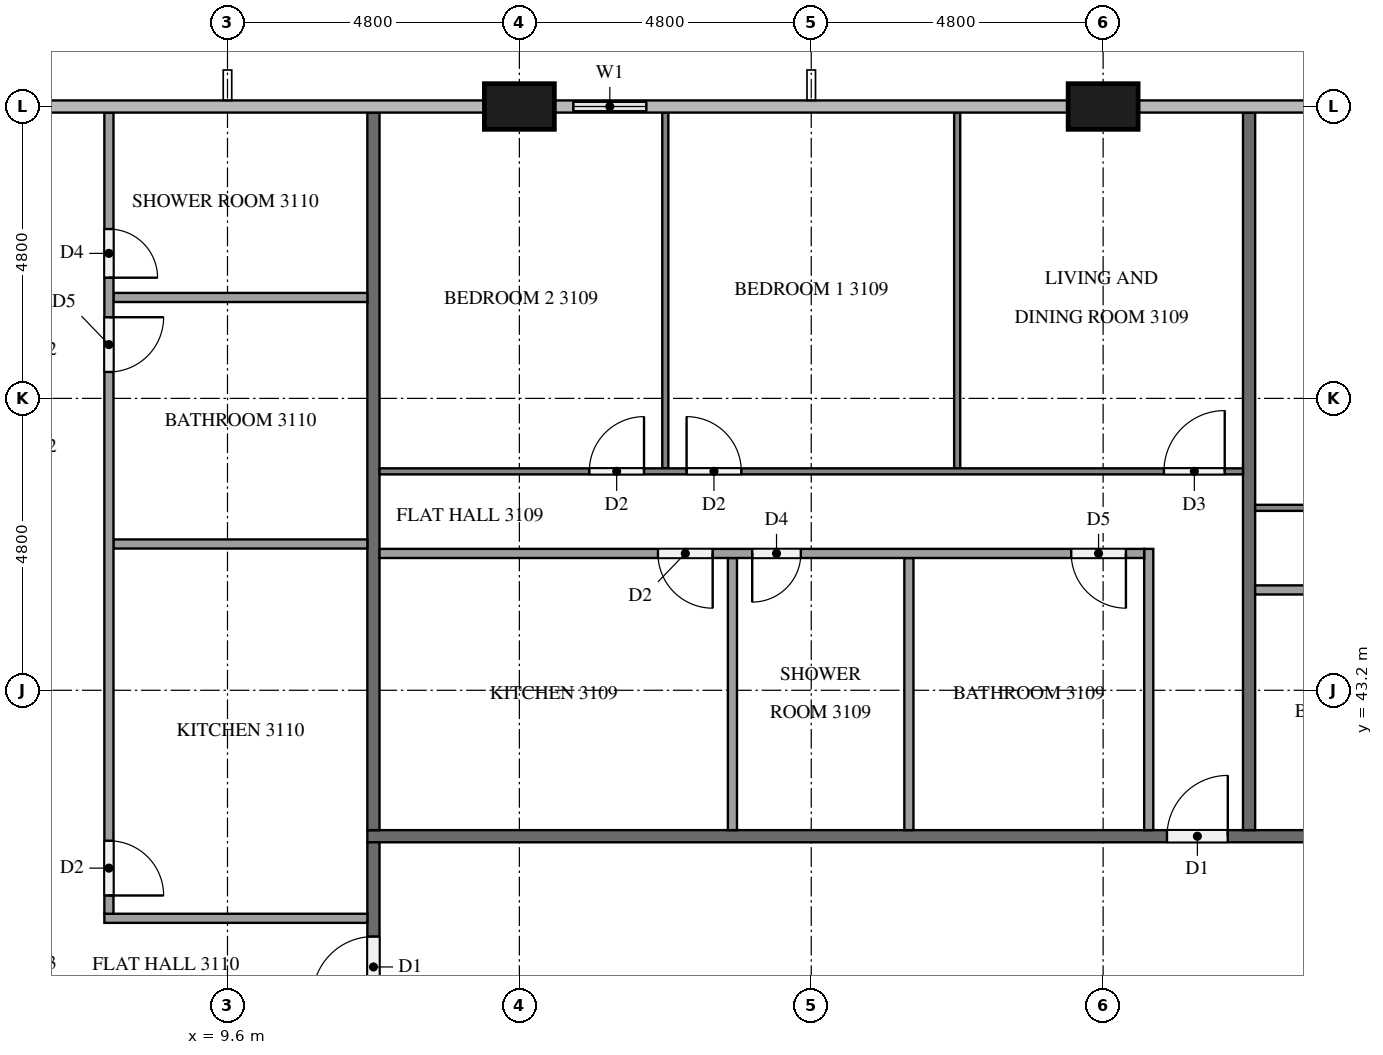
"""IFC4 building model, lengths in metres.
Left out: names, types, materials, properties, quantities, classifications, styles, units other than length and angle.
Written with IfcOpenShell. Run it as: python <this file> out.ifc"""

import sys

from ifc_helpers import new_model, si_unit, direction, frame, frame_2d, origin, origin_2d, place, context, subcontext, project, spatial, rectangle, extrude, element, fill, save


model = new_model("IFC4")
c1 = context("Model", 3, precision=1e-05, world=origin(), true_north=direction((0.0, 1.0)))
c2 = subcontext(c1, "Body", "Model", "MODEL_VIEW")
j1 = project(units=[si_unit("LENGTHUNIT", "METRE"), si_unit("PLANEANGLEUNIT", "RADIAN")], contexts=[c1])
p1 = place(None, origin())
s1 = spatial("IfcSite", under=j1, at=p1, CompositionType="ELEMENT")
p2 = place(p1, origin())
s2 = spatial("IfcBuilding", under=s1, at=p2, CompositionType="ELEMENT")
p3 = place(p2, frame((0.0, 0.0, 122.6)))
s3 = spatial("IfcBuildingStorey", under=s2, at=p3, CompositionType="ELEMENT", Elevation=122.6)
for number, where, z_axis, x_axis in (
    (1, (24.0, 52.8, 0.0), (0.0, 0.0, 1.0), (1.0, 0.0, 0.0)),
    (2, (14.4, 52.8, 0.0), (0.0, 0.0, 1.0), (1.0, 0.0, 0.0)),
):
    element("IfcColumn", number, at=place(p3, frame(where, z_axis=z_axis, x_axis=x_axis)), inside=s3, PredefinedType="COLUMN", context=c2, shape_type="SweptSolid", body=[
        extrude(rectangle(XDim=1.15, YDim=0.75, at=origin_2d()), origin(), (0.0, 0.0, 1.0), 3.2),
    ])
p4 = place(p3, frame((16.8, 52.8, 0.0), z_axis=(0.0, 0.0, 1.0), x_axis=(-1.0, 0.0, 0.0)))
e3 = element("IfcWall", 3, at=p4, inside=s3, PredefinedType="SOLIDWALL", context=c2, shape_type="SweptSolid", body=[
    extrude(rectangle(XDim=1.825, YDim=0.15, at=frame_2d((0.913, 0.0))), origin(), (0.0, 0.0, 1.0), 3.2),
])
p5 = place(p4, frame((0.312, 0.0, 0.9)))
e4 = element("IfcOpeningElement", 4, at=p5, cuts=e3, PredefinedType="OPENING", context=c2, shape_type="SweptSolid", body=[
    extrude(rectangle(XDim=1.2, YDim=1.4, at=frame_2d((0.6, 0.7))), frame((0.0, 0.085, 0.0), z_axis=(0.0, -1.0, 0.0), x_axis=(1.0, 0.0, 0.0)), (0.0, 0.0, 1.0), 0.17),
])
p6 = place(p3, frame((11.9, 40.8, 0.0), z_axis=(0.0, 0.0, 1.0), x_axis=(1.0, 0.0, 0.0)))
e5 = element("IfcWall", 5, at=p6, inside=s3, PredefinedType="PARTITIONING", context=c2, shape_type="SweptSolid", body=[
    extrude(rectangle(XDim=38.6, YDim=0.2, at=frame_2d((19.3, 0.0))), origin(), (0.0, 0.0, 1.0), 3.2),
])
p7 = place(p6, frame((37.15, 0.0, 0.0)))
e6 = element("IfcOpeningElement", 6, at=p7, cuts=e5, PredefinedType="OPENING", context=c2, shape_type="SweptSolid", body=[
    extrude(rectangle(XDim=1.0, YDim=2.1, at=frame_2d((0.5, 1.05))), frame((0.0, 0.11, 0.0), z_axis=(0.0, -1.0, 0.0), x_axis=(1.0, 0.0, 0.0)), (0.0, 0.0, 1.0), 0.22),
])
p8 = place(p6, frame((27.55, 0.0, 0.0)))
e7 = element("IfcOpeningElement", 7, at=p8, cuts=e5, PredefinedType="OPENING", context=c2, shape_type="SweptSolid", body=[
    extrude(rectangle(XDim=1.0, YDim=2.1, at=frame_2d((0.5, 1.05))), frame((0.0, 0.11, 0.0), z_axis=(0.0, -1.0, 0.0), x_axis=(1.0, 0.0, 0.0)), (0.0, 0.0, 1.0), 0.22),
])
p9 = place(p6, frame((13.15, 0.0, 0.0)))
e8 = element("IfcOpeningElement", 8, at=p9, cuts=e5, PredefinedType="OPENING", context=c2, shape_type="SweptSolid", body=[
    extrude(rectangle(XDim=1.0, YDim=2.1, at=frame_2d((0.5, 1.05))), frame((0.0, 0.11, 0.0), z_axis=(0.0, -1.0, 0.0), x_axis=(1.0, 0.0, 0.0)), (0.0, 0.0, 1.0), 0.22),
])
p10 = place(p3, frame((12.0, 37.9, 0.0), z_axis=(0.0, 0.0, 1.0), x_axis=(0.0, 1.0, 0.0)))
e9 = element("IfcWall", 9, at=p10, inside=s3, PredefinedType="PARTITIONING", context=c2, shape_type="SweptSolid", body=[
    extrude(rectangle(XDim=2.8, YDim=0.2, at=frame_2d((1.4, 0.0))), origin(), (0.0, 0.0, 1.0), 3.2),
])
p11 = place(p10, frame((0.25, 0.0, 0.0)))
e10 = element("IfcOpeningElement", 10, at=p11, cuts=e9, PredefinedType="OPENING", context=c2, shape_type="SweptSolid", body=[
    extrude(rectangle(XDim=1.0, YDim=2.1, at=frame_2d((0.5, 1.05))), frame((0.0, 0.11, 0.0), z_axis=(0.0, -1.0, 0.0), x_axis=(1.0, 0.0, 0.0)), (0.0, 0.0, 1.0), 0.22),
])
for number, where, z_axis, x_axis in (
    (11, (26.4, 52.7, 0.0), (0.0, 0.0, 1.0), (0.0, -1.0, 0.0)),
    (12, (12.0, 52.7, 0.0), (0.0, 0.0, 1.0), (0.0, -1.0, 0.0)),
):
    element("IfcWall", number, at=place(p3, frame(where, z_axis=z_axis, x_axis=x_axis)), inside=s3, PredefinedType="PARTITIONING", context=c2, shape_type="SweptSolid", body=[
        extrude(rectangle(XDim=11.8, YDim=0.2, at=frame_2d((5.9, 0.0))), origin(), (0.0, 0.0, 1.0), 3.2),
    ])
p12 = place(p3, frame((26.5, 46.2, 0.0), z_axis=(0.0, 0.0, 1.0), x_axis=(1.0, 0.0, 0.0)))
e13 = element("IfcWall", 13, at=p12, inside=s3, PredefinedType="PARTITIONING", context=c2, shape_type="SweptSolid", body=[
    extrude(rectangle(XDim=14.2, YDim=0.1, at=frame_2d((7.1, 0.0))), origin(), (0.0, 0.0, 1.0), 3.2),
])
p13 = place(p12, frame((12.9, 0.0, 0.0)))
e14 = element("IfcOpeningElement", 14, at=p13, cuts=e13, PredefinedType="OPENING", context=c2, shape_type="SweptSolid", body=[
    extrude(rectangle(XDim=1.0, YDim=2.1, at=frame_2d((0.5, 1.05))), frame((0.0, 0.06, 0.0), z_axis=(0.0, -1.0, 0.0), x_axis=(1.0, 0.0, 0.0)), (0.0, 0.0, 1.0), 0.12),
])
p14 = place(p12, frame((5.05, 0.0, 0.0)))
e15 = element("IfcOpeningElement", 15, at=p14, cuts=e13, PredefinedType="OPENING", context=c2, shape_type="SweptSolid", body=[
    extrude(rectangle(XDim=0.9, YDim=2.1, at=frame_2d((0.45, 1.05))), frame((0.0, 0.06, 0.0), z_axis=(0.0, -1.0, 0.0), x_axis=(1.0, 0.0, 0.0)), (0.0, 0.0, 1.0), 0.12),
])
p15 = place(p12, frame((3.45, 0.0, 0.0)))
e16 = element("IfcOpeningElement", 16, at=p15, cuts=e13, PredefinedType="OPENING", context=c2, shape_type="SweptSolid", body=[
    extrude(rectangle(XDim=0.9, YDim=2.1, at=frame_2d((0.45, 1.05))), frame((0.0, 0.06, 0.0), z_axis=(0.0, -1.0, 0.0), x_axis=(1.0, 0.0, 0.0)), (0.0, 0.0, 1.0), 0.12),
])
p16 = place(p3, frame((39.075, 44.85, 0.0), z_axis=(0.0, 0.0, 1.0), x_axis=(-1.0, 0.0, 0.0)))
e17 = element("IfcWall", 17, at=p16, inside=s3, PredefinedType="PARTITIONING", context=c2, shape_type="SweptSolid", body=[
    extrude(rectangle(XDim=12.575, YDim=0.15, at=frame_2d((6.288, 0.0))), origin(), (0.0, 0.0, 1.0), 3.2),
])
p17 = place(p16, frame((0.3, 0.0, 0.0)))
e18 = element("IfcOpeningElement", 18, at=p17, cuts=e17, PredefinedType="OPENING", context=c2, shape_type="SweptSolid", body=[
    extrude(rectangle(XDim=0.8, YDim=2.1, at=frame_2d((0.4, 1.05))), frame((0.0, 0.085, 0.0), z_axis=(0.0, -1.0, 0.0), x_axis=(1.0, 0.0, 0.0)), (0.0, 0.0, 1.0), 0.17),
])
p18 = place(p16, frame((7.481, 0.0, 0.0)))
e19 = element("IfcOpeningElement", 19, at=p18, cuts=e17, PredefinedType="OPENING", context=c2, shape_type="SweptSolid", body=[
    extrude(rectangle(XDim=0.9, YDim=2.1, at=frame_2d((0.45, 1.05))), frame((0.0, 0.085, 0.0), z_axis=(0.0, -1.0, 0.0), x_axis=(1.0, 0.0, 0.0)), (0.0, 0.0, 1.0), 0.17),
])
p19 = place(p16, frame((9.031, 0.0, 0.0)))
e20 = element("IfcOpeningElement", 20, at=p19, cuts=e17, PredefinedType="OPENING", context=c2, shape_type="SweptSolid", body=[
    extrude(rectangle(XDim=0.9, YDim=2.1, at=frame_2d((0.45, 1.05))), frame((0.0, 0.085, 0.0), z_axis=(0.0, -1.0, 0.0), x_axis=(1.0, 0.0, 0.0)), (0.0, 0.0, 1.0), 0.17),
])
for number, where, z_axis, x_axis in (
    (21, (21.6, 46.85, 0.0), (0.0, 0.0, 1.0), (0.0, 1.0, 0.0)),
    (22, (16.8, 46.85, 0.0), (0.0, 0.0, 1.0), (0.0, 1.0, 0.0)),
):
    element("IfcWall", number, at=place(p3, frame(where, z_axis=z_axis, x_axis=x_axis)), inside=s3, PredefinedType="PARTITIONING", context=c2, shape_type="SweptSolid", body=[
        extrude(rectangle(XDim=5.85, YDim=0.1, at=frame_2d((2.925, 0.0))), origin(), (0.0, 0.0, 1.0), 3.2),
    ])
p20 = place(p3, frame((12.1, 46.8, 0.0), z_axis=(0.0, 0.0, 1.0), x_axis=(1.0, 0.0, 0.0)))
e23 = element("IfcWall", 23, at=p20, inside=s3, PredefinedType="PARTITIONING", context=c2, shape_type="SweptSolid", body=[
    extrude(rectangle(XDim=14.2, YDim=0.1, at=frame_2d((7.1, 0.0))), origin(), (0.0, 0.0, 1.0), 3.2),
])
p21 = place(p20, frame((12.9, 0.0, 0.0)))
e24 = element("IfcOpeningElement", 24, at=p21, cuts=e23, PredefinedType="OPENING", context=c2, shape_type="SweptSolid", body=[
    extrude(rectangle(XDim=1.0, YDim=2.1, at=frame_2d((0.5, 1.05))), frame((0.0, 0.06, 0.0), z_axis=(0.0, -1.0, 0.0), x_axis=(1.0, 0.0, 0.0)), (0.0, 0.0, 1.0), 0.12),
])
p22 = place(p20, frame((5.05, 0.0, 0.0)))
e25 = element("IfcOpeningElement", 25, at=p22, cuts=e23, PredefinedType="OPENING", context=c2, shape_type="SweptSolid", body=[
    extrude(rectangle(XDim=0.9, YDim=2.1, at=frame_2d((0.45, 1.05))), frame((0.0, 0.06, 0.0), z_axis=(0.0, -1.0, 0.0), x_axis=(1.0, 0.0, 0.0)), (0.0, 0.0, 1.0), 0.12),
])
p23 = place(p20, frame((3.45, 0.0, 0.0)))
e26 = element("IfcOpeningElement", 26, at=p23, cuts=e23, PredefinedType="OPENING", context=c2, shape_type="SweptSolid", body=[
    extrude(rectangle(XDim=0.9, YDim=2.1, at=frame_2d((0.45, 1.05))), frame((0.0, 0.06, 0.0), z_axis=(0.0, -1.0, 0.0), x_axis=(1.0, 0.0, 0.0)), (0.0, 0.0, 1.0), 0.12),
])
for number, where, z_axis, x_axis in (
    (27, (20.806, 40.9, 0.0), (0.0, 0.0, 1.0), (0.0, 1.0, 0.0)),
    (28, (17.904, 40.9, 0.0), (0.0, 0.0, 1.0), (0.0, 1.0, 0.0)),
):
    element("IfcWall", number, at=place(p3, frame(where, z_axis=z_axis, x_axis=x_axis)), inside=s3, PredefinedType="PARTITIONING", context=c2, shape_type="SweptSolid", body=[
        extrude(rectangle(XDim=4.475, YDim=0.15, at=frame_2d((2.238, 0.0))), origin(), (0.0, 0.0, 1.0), 3.2),
    ])
p24 = place(p3, frame((24.75, 40.9, 0.0), z_axis=(0.0, 0.0, 1.0), x_axis=(0.0, 1.0, 0.0)))
e29 = element("IfcWall", 29, at=p24, inside=s3, PredefinedType="PARTITIONING", context=c2, shape_type="SweptSolid", body=[
    extrude(rectangle(XDim=4.625, YDim=0.15, at=frame_2d((2.312, 0.0))), origin(), (0.0, 0.0, 1.0), 3.2),
])
p25 = place(p3, frame((24.675, 45.45, 0.0), z_axis=(0.0, 0.0, 1.0), x_axis=(-1.0, 0.0, 0.0)))
e30 = element("IfcWall", 30, at=p25, inside=s3, PredefinedType="PARTITIONING", context=c2, shape_type="SweptSolid", body=[
    extrude(rectangle(XDim=12.575, YDim=0.15, at=frame_2d((6.288, 0.0))), origin(), (0.0, 0.0, 1.0), 3.2),
])
p26 = place(p25, frame((0.3, 0.0, 0.0)))
e31 = element("IfcOpeningElement", 31, at=p26, cuts=e30, PredefinedType="OPENING", context=c2, shape_type="SweptSolid", body=[
    extrude(rectangle(XDim=0.9, YDim=2.1, at=frame_2d((0.45, 1.05))), frame((0.0, 0.085, 0.0), z_axis=(0.0, -1.0, 0.0), x_axis=(1.0, 0.0, 0.0)), (0.0, 0.0, 1.0), 0.17),
])
p27 = place(p25, frame((5.646, 0.0, 0.0)))
e32 = element("IfcOpeningElement", 32, at=p27, cuts=e30, PredefinedType="OPENING", context=c2, shape_type="SweptSolid", body=[
    extrude(rectangle(XDim=0.8, YDim=2.1, at=frame_2d((0.4, 1.05))), frame((0.0, 0.085, 0.0), z_axis=(0.0, -1.0, 0.0), x_axis=(1.0, 0.0, 0.0)), (0.0, 0.0, 1.0), 0.17),
])
p28 = place(p25, frame((7.096, 0.0, 0.0)))
e33 = element("IfcOpeningElement", 33, at=p28, cuts=e30, PredefinedType="OPENING", context=c2, shape_type="SweptSolid", body=[
    extrude(rectangle(XDim=0.9, YDim=2.1, at=frame_2d((0.45, 1.05))), frame((0.0, 0.085, 0.0), z_axis=(0.0, -1.0, 0.0), x_axis=(1.0, 0.0, 0.0)), (0.0, 0.0, 1.0), 0.17),
])
for number, where, z_axis, x_axis in (
    (34, (11.9, 45.606, 0.0), (0.0, 0.0, 1.0), (-1.0, 0.0, 0.0)),
    (35, (11.9, 49.66, 0.0), (0.0, 0.0, 1.0), (-1.0, 0.0, 0.0)),
):
    element("IfcWall", number, at=place(p3, frame(where, z_axis=z_axis, x_axis=x_axis)), inside=s3, PredefinedType="PARTITIONING", context=c2, shape_type="SweptSolid", body=[
        extrude(rectangle(XDim=4.175, YDim=0.15, at=frame_2d((2.087, 0.0))), origin(), (0.0, 0.0, 1.0), 3.2),
    ])
p29 = place(p3, frame((11.9, 39.45, 0.0), z_axis=(0.0, 0.0, 1.0), x_axis=(-1.0, 0.0, 0.0)))
e36 = element("IfcWall", 36, at=p29, inside=s3, PredefinedType="PARTITIONING", context=c2, shape_type="SweptSolid", body=[
    extrude(rectangle(XDim=4.325, YDim=0.15, at=frame_2d((2.163, 0.0))), origin(), (0.0, 0.0, 1.0), 3.2),
])
p30 = place(p3, frame((7.65, 52.7, 0.0), z_axis=(0.0, 0.0, 1.0), x_axis=(0.0, -1.0, 0.0)))
e37 = element("IfcWall", 37, at=p30, inside=s3, PredefinedType="PARTITIONING", context=c2, shape_type="SweptSolid", body=[
    extrude(rectangle(XDim=13.175, YDim=0.15, at=frame_2d((6.587, 0.0))), origin(), (0.0, 0.0, 1.0), 3.2),
])
p31 = place(p30, frame((11.975, 0.0, 0.0)))
e38 = element("IfcOpeningElement", 38, at=p31, cuts=e37, PredefinedType="OPENING", context=c2, shape_type="SweptSolid", body=[
    extrude(rectangle(XDim=0.9, YDim=2.1, at=frame_2d((0.45, 1.05))), frame((0.0, 0.085, 0.0), z_axis=(0.0, -1.0, 0.0), x_axis=(1.0, 0.0, 0.0)), (0.0, 0.0, 1.0), 0.17),
])
p32 = place(p30, frame((3.365, 0.0, 0.0)))
e39 = element("IfcOpeningElement", 39, at=p32, cuts=e37, PredefinedType="OPENING", context=c2, shape_type="SweptSolid", body=[
    extrude(rectangle(XDim=0.9, YDim=2.1, at=frame_2d((0.45, 1.05))), frame((0.0, 0.085, 0.0), z_axis=(0.0, -1.0, 0.0), x_axis=(1.0, 0.0, 0.0)), (0.0, 0.0, 1.0), 0.17),
])
p33 = place(p30, frame((1.915, 0.0, 0.0)))
e40 = element("IfcOpeningElement", 40, at=p33, cuts=e37, PredefinedType="OPENING", context=c2, shape_type="SweptSolid", body=[
    extrude(rectangle(XDim=0.8, YDim=2.1, at=frame_2d((0.4, 1.05))), frame((0.0, 0.085, 0.0), z_axis=(0.0, -1.0, 0.0), x_axis=(1.0, 0.0, 0.0)), (0.0, 0.0, 1.0), 0.17),
])
p34 = place(p5, origin())
e41 = element("IfcWindow", 41, at=p34, inside=s3, PartitioningType="SINGLE_PANEL", PredefinedType="WINDOW", context=c2, shape_type="SweptSolid", body=[
    extrude(rectangle(XDim=1.2, YDim=1.4, at=frame_2d((0.6, 0.7))), frame((0.0, 0.03, 0.0), z_axis=(0.0, -1.0, 0.0), x_axis=(1.0, 0.0, 0.0)), (0.0, 0.0, 1.0), 0.06),
])
fill(e4, e41)
p35 = place(p9, origin())
e42 = element("IfcDoor", 42, at=p35, inside=s3, OperationType="SINGLE_SWING_RIGHT", PredefinedType="DOOR", context=c2, shape_type="SweptSolid", body=[
    extrude(rectangle(XDim=1.0, YDim=2.1, at=frame_2d((0.5, 1.05))), frame((0.0, 0.025, 0.0), z_axis=(0.0, -1.0, 0.0), x_axis=(1.0, 0.0, 0.0)), (0.0, 0.0, 1.0), 0.05),
])
fill(e8, e42)
p36 = place(p11, origin())
e43 = element("IfcDoor", 43, at=p36, inside=s3, OperationType="SINGLE_SWING_LEFT", PredefinedType="DOOR", context=c2, shape_type="SweptSolid", body=[
    extrude(rectangle(XDim=1.0, YDim=2.1, at=frame_2d((0.5, 1.05))), frame((0.0, 0.025, 0.0), z_axis=(0.0, -1.0, 0.0), x_axis=(1.0, 0.0, 0.0)), (0.0, 0.0, 1.0), 0.05),
])
fill(e10, e43)
p37 = place(p21, origin())
e44 = element("IfcDoor", 44, at=p37, inside=s3, OperationType="SINGLE_SWING_RIGHT", PredefinedType="DOOR", context=c2, shape_type="SweptSolid", body=[
    extrude(rectangle(XDim=1.0, YDim=2.1, at=frame_2d((0.5, 1.05))), frame((0.0, 0.025, 0.0), z_axis=(0.0, -1.0, 0.0), x_axis=(1.0, 0.0, 0.0)), (0.0, 0.0, 1.0), 0.05),
])
fill(e24, e44)
p38 = place(p22, origin())
e45 = element("IfcDoor", 45, at=p38, inside=s3, OperationType="SINGLE_SWING_LEFT", PredefinedType="DOOR", context=c2, shape_type="SweptSolid", body=[
    extrude(rectangle(XDim=0.9, YDim=2.1, at=frame_2d((0.45, 1.05))), frame((0.0, 0.025, 0.0), z_axis=(0.0, -1.0, 0.0), x_axis=(1.0, 0.0, 0.0)), (0.0, 0.0, 1.0), 0.05),
])
fill(e25, e45)
p39 = place(p23, origin())
e46 = element("IfcDoor", 46, at=p39, inside=s3, OperationType="SINGLE_SWING_RIGHT", PredefinedType="DOOR", context=c2, shape_type="SweptSolid", body=[
    extrude(rectangle(XDim=0.9, YDim=2.1, at=frame_2d((0.45, 1.05))), frame((0.0, 0.025, 0.0), z_axis=(0.0, -1.0, 0.0), x_axis=(1.0, 0.0, 0.0)), (0.0, 0.0, 1.0), 0.05),
])
fill(e26, e46)
p40 = place(p26, origin())
e47 = element("IfcDoor", 47, at=p40, inside=s3, OperationType="SINGLE_SWING_LEFT", PredefinedType="DOOR", context=c2, shape_type="SweptSolid", body=[
    extrude(rectangle(XDim=0.9, YDim=2.1, at=frame_2d((0.45, 1.05))), frame((0.0, 0.025, 0.0), z_axis=(0.0, -1.0, 0.0), x_axis=(1.0, 0.0, 0.0)), (0.0, 0.0, 1.0), 0.05),
])
fill(e31, e47)
p41 = place(p27, origin())
e48 = element("IfcDoor", 48, at=p41, inside=s3, OperationType="SINGLE_SWING_RIGHT", PredefinedType="DOOR", context=c2, shape_type="SweptSolid", body=[
    extrude(rectangle(XDim=0.8, YDim=2.1, at=frame_2d((0.4, 1.05))), frame((0.0, 0.025, 0.0), z_axis=(0.0, -1.0, 0.0), x_axis=(1.0, 0.0, 0.0)), (0.0, 0.0, 1.0), 0.05),
])
fill(e32, e48)
p42 = place(p28, origin())
e49 = element("IfcDoor", 49, at=p42, inside=s3, OperationType="SINGLE_SWING_LEFT", PredefinedType="DOOR", context=c2, shape_type="SweptSolid", body=[
    extrude(rectangle(XDim=0.9, YDim=2.1, at=frame_2d((0.45, 1.05))), frame((0.0, 0.025, 0.0), z_axis=(0.0, -1.0, 0.0), x_axis=(1.0, 0.0, 0.0)), (0.0, 0.0, 1.0), 0.05),
])
fill(e33, e49)
p43 = place(p31, origin())
e50 = element("IfcDoor", 50, at=p43, inside=s3, OperationType="SINGLE_SWING_RIGHT", PredefinedType="DOOR", context=c2, shape_type="SweptSolid", body=[
    extrude(rectangle(XDim=0.9, YDim=2.1, at=frame_2d((0.45, 1.05))), frame((0.0, 0.025, 0.0), z_axis=(0.0, -1.0, 0.0), x_axis=(1.0, 0.0, 0.0)), (0.0, 0.0, 1.0), 0.05),
])
fill(e38, e50)
p44 = place(p32, origin())
e51 = element("IfcDoor", 51, at=p44, inside=s3, OperationType="SINGLE_SWING_LEFT", PredefinedType="DOOR", context=c2, shape_type="SweptSolid", body=[
    extrude(rectangle(XDim=0.9, YDim=2.1, at=frame_2d((0.45, 1.05))), frame((0.0, 0.025, 0.0), z_axis=(0.0, -1.0, 0.0), x_axis=(1.0, 0.0, 0.0)), (0.0, 0.0, 1.0), 0.05),
])
fill(e39, e51)
p45 = place(p33, origin())
e52 = element("IfcDoor", 52, at=p45, inside=s3, OperationType="SINGLE_SWING_RIGHT", PredefinedType="DOOR", context=c2, shape_type="SweptSolid", body=[
    extrude(rectangle(XDim=0.8, YDim=2.1, at=frame_2d((0.4, 1.05))), frame((0.0, 0.025, 0.0), z_axis=(0.0, -1.0, 0.0), x_axis=(1.0, 0.0, 0.0)), (0.0, 0.0, 1.0), 0.05),
])
fill(e40, e52)
save(model, sys.argv[1])
